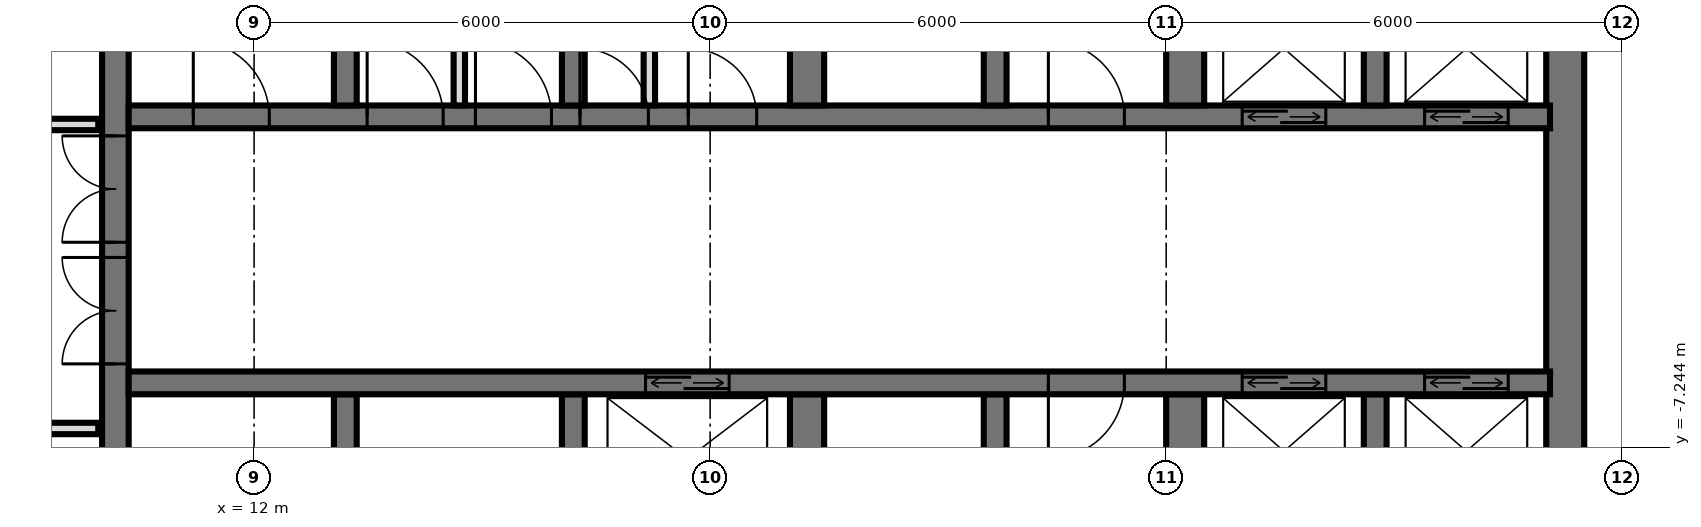
"""IFC4 building model, lengths in metres.
Left out: names, types, materials, properties, quantities, classifications, styles, units other than length and angle.
Written with IfcOpenShell. Run it as: python <this file> out.ifc"""

import sys

from ifc_helpers import new_model, si_unit, direction, frame, frame_2d, origin, place, context, subcontext, project, spatial, rectangle, extrude, element, fill, save


model = new_model("IFC4")
c1 = context("Model", 3, precision=1e-05, world=origin(), true_north=direction((0.0, 1.0)))
c2 = subcontext(c1, "Body", "Model", "MODEL_VIEW")
j1 = project(units=[si_unit("LENGTHUNIT", "METRE"), si_unit("PLANEANGLEUNIT", "RADIAN")], contexts=[c1])
p1 = place(None, origin())
s1 = spatial("IfcSite", under=j1, at=p1, CompositionType="ELEMENT")
p2 = place(p1, origin())
s2 = spatial("IfcBuilding", under=s1, at=p2, CompositionType="ELEMENT")
p3 = place(p2, frame((0.0, 0.0, 34.8)))
s3 = spatial("IfcBuildingStorey", under=s2, at=p3, CompositionType="ELEMENT", Elevation=34.8)
p4 = place(p3, frame((10.175, -14.55, 0.0), z_axis=(0.0, 0.0, 1.0), x_axis=(0.0, 1.0, 0.0)))
e1 = element("IfcWall", 1, at=p4, inside=s3, PredefinedType="SHEAR", context=c2, shape_type="SweptSolid", body=[
    extrude(rectangle(XDim=14.1, YDim=0.35, at=frame_2d((7.05, 0.0))), origin(), (0.0, 0.0, 1.0), 3.6),
])
p5 = place(p4, frame((8.4, 0.0, 0.0)))
e2 = element("IfcOpeningElement", 2, at=p5, cuts=e1, PredefinedType="OPENING", context=c2, shape_type="SweptSolid", body=[
    extrude(rectangle(XDim=1.4, YDim=2.4, at=frame_2d((0.7, 1.2))), frame((0.0, 0.185, 0.0), z_axis=(0.0, -1.0, 0.0), x_axis=(1.0, 0.0, 0.0)), (0.0, 0.0, 1.0), 0.37),
])
p6 = place(p4, frame((10.0, 0.0, 0.0)))
e3 = element("IfcOpeningElement", 3, at=p6, cuts=e1, PredefinedType="OPENING", context=c2, shape_type="SweptSolid", body=[
    extrude(rectangle(XDim=1.4, YDim=2.4, at=frame_2d((0.7, 1.2))), frame((0.0, 0.185, 0.0), z_axis=(0.0, -1.0, 0.0), x_axis=(1.0, 0.0, 0.0)), (0.0, 0.0, 1.0), 0.37),
])
p7 = place(p4, frame((4.0, 0.0, 0.0)))
e4 = element("IfcOpeningElement", 4, at=p7, cuts=e1, PredefinedType="OPENING", context=c2, shape_type="SweptSolid", body=[
    extrude(rectangle(XDim=1.2, YDim=2.1, at=frame_2d((0.6, 1.05))), frame((0.0, 0.185, 0.0), z_axis=(0.0, -1.0, 0.0), x_axis=(1.0, 0.0, 0.0)), (0.0, 0.0, 1.0), 0.37),
])
p8 = place(p3, frame((29.25, -14.55, 0.0), z_axis=(0.0, 0.0, 1.0), x_axis=(0.0, 1.0, 0.0)))
e5 = element("IfcWall", 5, at=p8, inside=s3, PredefinedType="SHEAR", context=c2, shape_type="SweptSolid", body=[
    extrude(rectangle(XDim=14.1, YDim=0.5, at=frame_2d((7.05, 0.0))), origin(), (0.0, 0.0, 1.0), 3.6),
])
p9 = place(p3, frame((10.35, -2.9, 0.0), z_axis=(0.0, 0.0, 1.0), x_axis=(1.0, 0.0, 0.0)))
e6 = element("IfcWall", 6, at=p9, inside=s3, PredefinedType="SHEAR", context=c2, shape_type="SweptSolid", body=[
    extrude(rectangle(XDim=18.7, YDim=0.3, at=frame_2d((9.35, 0.0))), origin(), (0.0, 0.0, 1.0), 3.6),
])
p10 = place(p9, frame((14.65, 0.0, 0.0)))
e7 = element("IfcOpeningElement", 7, at=p10, cuts=e6, PredefinedType="OPENING", context=c2, shape_type="SweptSolid", body=[
    extrude(rectangle(XDim=1.1, YDim=2.1, at=frame_2d((0.55, 1.05))), frame((0.0, 0.16, 0.0), z_axis=(0.0, -1.0, 0.0), x_axis=(1.0, 0.0, 0.0)), (0.0, 0.0, 1.0), 0.32),
])
p11 = place(p9, frame((17.05, 0.0, 0.0)))
e8 = element("IfcOpeningElement", 8, at=p11, cuts=e6, PredefinedType="OPENING", context=c2, shape_type="SweptSolid", body=[
    extrude(rectangle(XDim=1.1, YDim=2.1, at=frame_2d((0.55, 1.05))), frame((0.0, 0.16, 0.0), z_axis=(0.0, -1.0, 0.0), x_axis=(1.0, 0.0, 0.0)), (0.0, 0.0, 1.0), 0.32),
])
p12 = place(p9, frame((5.938, 0.0, 0.0)))
e9 = element("IfcOpeningElement", 9, at=p12, cuts=e6, PredefinedType="OPENING", context=c2, shape_type="SweptSolid", body=[
    extrude(rectangle(XDim=0.9, YDim=2.1, at=frame_2d((0.45, 1.05))), frame((0.0, 0.16, 0.0), z_axis=(0.0, -1.0, 0.0), x_axis=(1.0, 0.0, 0.0)), (0.0, 0.0, 1.0), 0.32),
])
p13 = place(p9, frame((7.363, 0.0, 0.0)))
e10 = element("IfcOpeningElement", 10, at=p13, cuts=e6, PredefinedType="OPENING", context=c2, shape_type="SweptSolid", body=[
    extrude(rectangle(XDim=0.9, YDim=2.1, at=frame_2d((0.45, 1.05))), frame((0.0, 0.16, 0.0), z_axis=(0.0, -1.0, 0.0), x_axis=(1.0, 0.0, 0.0)), (0.0, 0.0, 1.0), 0.32),
])
p14 = place(p9, frame((0.85, 0.0, 0.0)))
e11 = element("IfcOpeningElement", 11, at=p14, cuts=e6, PredefinedType="OPENING", context=c2, shape_type="SweptSolid", body=[
    extrude(rectangle(XDim=1.0, YDim=2.1, at=frame_2d((0.5, 1.05))), frame((0.0, 0.16, 0.0), z_axis=(0.0, -1.0, 0.0), x_axis=(1.0, 0.0, 0.0)), (0.0, 0.0, 1.0), 0.32),
])
p15 = place(p9, frame((3.137, 0.0, 0.0)))
e12 = element("IfcOpeningElement", 12, at=p15, cuts=e6, PredefinedType="OPENING", context=c2, shape_type="SweptSolid", body=[
    extrude(rectangle(XDim=1.0, YDim=2.1, at=frame_2d((0.5, 1.05))), frame((0.0, 0.16, 0.0), z_axis=(0.0, -1.0, 0.0), x_axis=(1.0, 0.0, 0.0)), (0.0, 0.0, 1.0), 0.32),
])
p16 = place(p9, frame((4.562, 0.0, 0.0)))
e13 = element("IfcOpeningElement", 13, at=p16, cuts=e6, PredefinedType="OPENING", context=c2, shape_type="SweptSolid", body=[
    extrude(rectangle(XDim=1.0, YDim=2.1, at=frame_2d((0.5, 1.05))), frame((0.0, 0.16, 0.0), z_axis=(0.0, -1.0, 0.0), x_axis=(1.0, 0.0, 0.0)), (0.0, 0.0, 1.0), 0.32),
])
p17 = place(p9, frame((12.1, 0.0, 0.0)))
e14 = element("IfcOpeningElement", 14, at=p17, cuts=e6, PredefinedType="OPENING", context=c2, shape_type="SweptSolid", body=[
    extrude(rectangle(XDim=1.0, YDim=2.1, at=frame_2d((0.5, 1.05))), frame((0.0, 0.16, 0.0), z_axis=(0.0, -1.0, 0.0), x_axis=(1.0, 0.0, 0.0)), (0.0, 0.0, 1.0), 0.32),
])
p18 = place(p3, frame((10.35, -6.4, 0.0), z_axis=(0.0, 0.0, 1.0), x_axis=(1.0, 0.0, 0.0)))
e15 = element("IfcWall", 15, at=p18, inside=s3, PredefinedType="SHEAR", context=c2, shape_type="SweptSolid", body=[
    extrude(rectangle(XDim=18.7, YDim=0.3, at=frame_2d((9.35, 0.0))), origin(), (0.0, 0.0, 1.0), 3.6),
])
p19 = place(p18, frame((14.65, 0.0, 0.0)))
e16 = element("IfcOpeningElement", 16, at=p19, cuts=e15, PredefinedType="OPENING", context=c2, shape_type="SweptSolid", body=[
    extrude(rectangle(XDim=1.1, YDim=2.1, at=frame_2d((0.55, 1.05))), frame((0.0, 0.16, 0.0), z_axis=(0.0, -1.0, 0.0), x_axis=(1.0, 0.0, 0.0)), (0.0, 0.0, 1.0), 0.32),
])
p20 = place(p18, frame((17.05, 0.0, 0.0)))
e17 = element("IfcOpeningElement", 17, at=p20, cuts=e15, PredefinedType="OPENING", context=c2, shape_type="SweptSolid", body=[
    extrude(rectangle(XDim=1.1, YDim=2.1, at=frame_2d((0.55, 1.05))), frame((0.0, 0.16, 0.0), z_axis=(0.0, -1.0, 0.0), x_axis=(1.0, 0.0, 0.0)), (0.0, 0.0, 1.0), 0.32),
])
p21 = place(p18, frame((6.8, 0.0, 0.0)))
e18 = element("IfcOpeningElement", 18, at=p21, cuts=e15, PredefinedType="OPENING", context=c2, shape_type="SweptSolid", body=[
    extrude(rectangle(XDim=1.1, YDim=2.1, at=frame_2d((0.55, 1.05))), frame((0.0, 0.16, 0.0), z_axis=(0.0, -1.0, 0.0), x_axis=(1.0, 0.0, 0.0)), (0.0, 0.0, 1.0), 0.32),
])
p22 = place(p18, frame((12.1, 0.0, 0.0)))
e19 = element("IfcOpeningElement", 19, at=p22, cuts=e15, PredefinedType="OPENING", context=c2, shape_type="SweptSolid", body=[
    extrude(rectangle(XDim=1.0, YDim=2.1, at=frame_2d((0.5, 1.05))), frame((0.0, 0.16, 0.0), z_axis=(0.0, -1.0, 0.0), x_axis=(1.0, 0.0, 0.0)), (0.0, 0.0, 1.0), 0.32),
])
for number, where, z_axis, x_axis in (
    (20, (13.2, -2.75, 0.0), (0.0, 0.0, 1.0), (0.0, 1.0, 0.0)),
    (21, (13.2, -8.85, 0.0), (0.0, 0.0, 1.0), (0.0, 1.0, 0.0)),
    (22, (16.2, -2.75, 0.0), (0.0, 0.0, 1.0), (0.0, 1.0, 0.0)),
    (23, (16.2, -8.85, 0.0), (0.0, 0.0, 1.0), (0.0, 1.0, 0.0)),
):
    element("IfcWall", number, at=place(p3, frame(where, z_axis=z_axis, x_axis=x_axis)), inside=s3, PredefinedType="SHEAR", context=c2, shape_type="SweptSolid", body=[
        extrude(rectangle(XDim=2.3, YDim=0.3, at=frame_2d((1.15, 0.0))), origin(), (0.0, 0.0, 1.0), 3.6),
    ])
for number, where, z_axis, x_axis in (
    (24, (19.275, -2.75, 0.0), (0.0, 0.0, 1.0), (0.0, 1.0, 0.0)),
    (25, (19.275, -8.85, 0.0), (0.0, 0.0, 1.0), (0.0, 1.0, 0.0)),
):
    element("IfcWall", number, at=place(p3, frame(where, z_axis=z_axis, x_axis=x_axis)), inside=s3, PredefinedType="SHEAR", context=c2, shape_type="SweptSolid", body=[
        extrude(rectangle(XDim=2.3, YDim=0.45, at=frame_2d((1.15, 0.0))), origin(), (0.0, 0.0, 1.0), 3.6),
    ])
for number, where, z_axis, x_axis in (
    (26, (21.75, -2.75, 0.0), (0.0, 0.0, 1.0), (0.0, 1.0, 0.0)),
    (27, (21.75, -8.85, 0.0), (0.0, 0.0, 1.0), (0.0, 1.0, 0.0)),
):
    element("IfcWall", number, at=place(p3, frame(where, z_axis=z_axis, x_axis=x_axis)), inside=s3, PredefinedType="SHEAR", context=c2, shape_type="SweptSolid", body=[
        extrude(rectangle(XDim=2.3, YDim=0.3, at=frame_2d((1.15, 0.0))), origin(), (0.0, 0.0, 1.0), 3.6),
    ])
for number, where, z_axis, x_axis in (
    (28, (24.25, -2.75, 0.0), (0.0, 0.0, 1.0), (0.0, 1.0, 0.0)),
    (29, (24.25, -8.85, 0.0), (0.0, 0.0, 1.0), (0.0, 1.0, 0.0)),
):
    element("IfcWall", number, at=place(p3, frame(where, z_axis=z_axis, x_axis=x_axis)), inside=s3, PredefinedType="SHEAR", context=c2, shape_type="SweptSolid", body=[
        extrude(rectangle(XDim=2.3, YDim=0.5, at=frame_2d((1.15, 0.0))), origin(), (0.0, 0.0, 1.0), 3.6),
    ])
for number, where, z_axis, x_axis in (
    (30, (26.75, -2.75, 0.0), (0.0, 0.0, 1.0), (0.0, 1.0, 0.0)),
    (31, (26.75, -8.85, 0.0), (0.0, 0.0, 1.0), (0.0, 1.0, 0.0)),
):
    element("IfcWall", number, at=place(p3, frame(where, z_axis=z_axis, x_axis=x_axis)), inside=s3, PredefinedType="SHEAR", context=c2, shape_type="SweptSolid", body=[
        extrude(rectangle(XDim=2.3, YDim=0.3, at=frame_2d((1.15, 0.0))), origin(), (0.0, 0.0, 1.0), 3.6),
    ])
for number, where, z_axis, x_axis in (
    (32, (17.2, -2.75, 0.0), (0.0, 0.0, 1.0), (0.0, 1.0, 0.0)),
    (33, (14.7, -2.75, 0.0), (0.0, 0.0, 1.0), (0.0, 1.0, 0.0)),
):
    element("IfcWall", number, at=place(p3, frame(where, z_axis=z_axis, x_axis=x_axis)), inside=s3, PredefinedType="PARTITIONING", context=c2, shape_type="SweptSolid", body=[
        extrude(rectangle(XDim=2.3, YDim=0.15, at=frame_2d((1.15, 0.0))), origin(), (0.0, 0.0, 1.0), 3.3),
    ])
p23 = place(p3, frame((-9.95, -7.0, 0.0), z_axis=(0.0, 0.0, 1.0), x_axis=(1.0, 0.0, 0.0)))
e34 = element("IfcWall", 34, at=p23, inside=s3, PredefinedType="PARTITIONING", context=c2, shape_type="SweptSolid", body=[
    extrude(rectangle(XDim=19.9, YDim=0.15, at=frame_2d((9.95, 0.0))), origin(), (0.0, 0.0, 1.0), 3.32),
])
p24 = place(p23, frame((9.45, 0.0, 0.0)))
e35 = element("IfcOpeningElement", 35, at=p24, cuts=e34, PredefinedType="OPENING", context=c2, shape_type="SweptSolid", body=[
    extrude(rectangle(XDim=1.0, YDim=2.1, at=frame_2d((0.5, 1.05))), frame((0.0, 0.085, 0.0), z_axis=(0.0, -1.0, 0.0), x_axis=(1.0, 0.0, 0.0)), (0.0, 0.0, 1.0), 0.17),
])
p25 = place(p23, frame((15.45, 0.0, 0.0)))
e36 = element("IfcOpeningElement", 36, at=p25, cuts=e34, PredefinedType="OPENING", context=c2, shape_type="SweptSolid", body=[
    extrude(rectangle(XDim=1.0, YDim=2.1, at=frame_2d((0.5, 1.05))), frame((0.0, 0.085, 0.0), z_axis=(0.0, -1.0, 0.0), x_axis=(1.0, 0.0, 0.0)), (0.0, 0.0, 1.0), 0.17),
])
p26 = place(p3, frame((-9.95, -3.0, 0.0), z_axis=(0.0, 0.0, 1.0), x_axis=(1.0, 0.0, 0.0)))
e37 = element("IfcWall", 37, at=p26, inside=s3, PredefinedType="PARTITIONING", context=c2, shape_type="SweptSolid", body=[
    extrude(rectangle(XDim=19.9, YDim=0.15, at=frame_2d((9.95, 0.0))), origin(), (0.0, 0.0, 1.0), 3.32),
])
p27 = place(p26, frame((1.7, 0.0, 0.0)))
e38 = element("IfcOpeningElement", 38, at=p27, cuts=e37, PredefinedType="OPENING", context=c2, shape_type="SweptSolid", body=[
    extrude(rectangle(XDim=1.0, YDim=2.1, at=frame_2d((0.5, 1.05))), frame((0.0, 0.085, 0.0), z_axis=(0.0, -1.0, 0.0), x_axis=(1.0, 0.0, 0.0)), (0.0, 0.0, 1.0), 0.17),
])
p28 = place(p26, frame((5.45, 0.0, 0.0)))
e39 = element("IfcOpeningElement", 39, at=p28, cuts=e37, PredefinedType="OPENING", context=c2, shape_type="SweptSolid", body=[
    extrude(rectangle(XDim=1.0, YDim=2.1, at=frame_2d((0.5, 1.05))), frame((0.0, 0.085, 0.0), z_axis=(0.0, -1.0, 0.0), x_axis=(1.0, 0.0, 0.0)), (0.0, 0.0, 1.0), 0.17),
])
p29 = place(p26, frame((8.2, 0.0, 0.0)))
e40 = element("IfcOpeningElement", 40, at=p29, cuts=e37, PredefinedType="OPENING", context=c2, shape_type="SweptSolid", body=[
    extrude(rectangle(XDim=1.0, YDim=2.1, at=frame_2d((0.5, 1.05))), frame((0.0, 0.085, 0.0), z_axis=(0.0, -1.0, 0.0), x_axis=(1.0, 0.0, 0.0)), (0.0, 0.0, 1.0), 0.17),
])
p30 = place(p26, frame((11.95, 0.0, 0.0)))
e41 = element("IfcOpeningElement", 41, at=p30, cuts=e37, PredefinedType="OPENING", context=c2, shape_type="SweptSolid", body=[
    extrude(rectangle(XDim=1.0, YDim=2.1, at=frame_2d((0.5, 1.05))), frame((0.0, 0.085, 0.0), z_axis=(0.0, -1.0, 0.0), x_axis=(1.0, 0.0, 0.0)), (0.0, 0.0, 1.0), 0.17),
])
p31 = place(p26, frame((16.95, 0.0, 0.0)))
e42 = element("IfcOpeningElement", 42, at=p31, cuts=e37, PredefinedType="OPENING", context=c2, shape_type="SweptSolid", body=[
    extrude(rectangle(XDim=1.0, YDim=2.1, at=frame_2d((0.5, 1.05))), frame((0.0, 0.085, 0.0), z_axis=(0.0, -1.0, 0.0), x_axis=(1.0, 0.0, 0.0)), (0.0, 0.0, 1.0), 0.17),
])
p32 = place(p10, origin())
e43 = element("IfcDoor", 43, at=p32, inside=s3, OperationType="DOUBLE_DOOR_SLIDING", PredefinedType="USERDEFINED", context=c2, shape_type="SweptSolid", body=[
    extrude(rectangle(XDim=1.1, YDim=2.1, at=frame_2d((0.55, 1.05))), frame((0.0, 0.025, 0.0), z_axis=(0.0, -1.0, 0.0), x_axis=(1.0, 0.0, 0.0)), (0.0, 0.0, 1.0), 0.05),
])
fill(e7, e43)
p33 = place(p11, origin())
e44 = element("IfcDoor", 44, at=p33, inside=s3, OperationType="DOUBLE_DOOR_SLIDING", PredefinedType="USERDEFINED", context=c2, shape_type="SweptSolid", body=[
    extrude(rectangle(XDim=1.1, YDim=2.1, at=frame_2d((0.55, 1.05))), frame((0.0, 0.025, 0.0), z_axis=(0.0, -1.0, 0.0), x_axis=(1.0, 0.0, 0.0)), (0.0, 0.0, 1.0), 0.05),
])
fill(e8, e44)
p34 = place(p19, origin())
e45 = element("IfcDoor", 45, at=p34, inside=s3, OperationType="DOUBLE_DOOR_SLIDING", PredefinedType="USERDEFINED", context=c2, shape_type="SweptSolid", body=[
    extrude(rectangle(XDim=1.1, YDim=2.1, at=frame_2d((0.55, 1.05))), frame((0.0, 0.025, 0.0), z_axis=(0.0, -1.0, 0.0), x_axis=(1.0, 0.0, 0.0)), (0.0, 0.0, 1.0), 0.05),
])
fill(e16, e45)
p35 = place(p20, origin())
e46 = element("IfcDoor", 46, at=p35, inside=s3, OperationType="DOUBLE_DOOR_SLIDING", PredefinedType="USERDEFINED", context=c2, shape_type="SweptSolid", body=[
    extrude(rectangle(XDim=1.1, YDim=2.1, at=frame_2d((0.55, 1.05))), frame((0.0, 0.025, 0.0), z_axis=(0.0, -1.0, 0.0), x_axis=(1.0, 0.0, 0.0)), (0.0, 0.0, 1.0), 0.05),
])
fill(e17, e46)
p36 = place(p21, origin())
e47 = element("IfcDoor", 47, at=p36, inside=s3, OperationType="DOUBLE_DOOR_SLIDING", PredefinedType="USERDEFINED", context=c2, shape_type="SweptSolid", body=[
    extrude(rectangle(XDim=1.1, YDim=2.1, at=frame_2d((0.55, 1.05))), frame((0.0, 0.025, 0.0), z_axis=(0.0, -1.0, 0.0), x_axis=(1.0, 0.0, 0.0)), (0.0, 0.0, 1.0), 0.05),
])
fill(e18, e47)
p37 = place(p5, origin())
e48 = element("IfcDoor", 48, at=p37, inside=s3, OperationType="DOUBLE_DOOR_SINGLE_SWING", PredefinedType="DOOR", context=c2, shape_type="SweptSolid", body=[
    extrude(rectangle(XDim=1.4, YDim=2.4, at=frame_2d((0.7, 1.2))), frame((0.0, 0.025, 0.0), z_axis=(0.0, -1.0, 0.0), x_axis=(1.0, 0.0, 0.0)), (0.0, 0.0, 1.0), 0.05),
])
fill(e2, e48)
p38 = place(p6, origin())
e49 = element("IfcDoor", 49, at=p38, inside=s3, OperationType="DOUBLE_DOOR_SINGLE_SWING", PredefinedType="DOOR", context=c2, shape_type="SweptSolid", body=[
    extrude(rectangle(XDim=1.4, YDim=2.4, at=frame_2d((0.7, 1.2))), frame((0.0, 0.025, 0.0), z_axis=(0.0, -1.0, 0.0), x_axis=(1.0, 0.0, 0.0)), (0.0, 0.0, 1.0), 0.05),
])
fill(e3, e49)
p39 = place(p12, origin())
e50 = element("IfcDoor", 50, at=p39, inside=s3, OperationType="SINGLE_SWING_RIGHT", PredefinedType="DOOR", context=c2, shape_type="SweptSolid", body=[
    extrude(rectangle(XDim=0.9, YDim=2.1, at=frame_2d((0.45, 1.05))), frame((0.0, 0.025, 0.0), z_axis=(0.0, -1.0, 0.0), x_axis=(1.0, 0.0, 0.0)), (0.0, 0.0, 1.0), 0.05),
])
fill(e9, e50)
p40 = place(p13, origin())
e51 = element("IfcDoor", 51, at=p40, inside=s3, OperationType="SINGLE_SWING_RIGHT", PredefinedType="DOOR", context=c2, shape_type="SweptSolid", body=[
    extrude(rectangle(XDim=0.9, YDim=2.1, at=frame_2d((0.45, 1.05))), frame((0.0, 0.025, 0.0), z_axis=(0.0, -1.0, 0.0), x_axis=(1.0, 0.0, 0.0)), (0.0, 0.0, 1.0), 0.05),
])
fill(e10, e51)
p41 = place(p14, origin())
e52 = element("IfcDoor", 52, at=p41, inside=s3, OperationType="SINGLE_SWING_RIGHT", PredefinedType="DOOR", context=c2, shape_type="SweptSolid", body=[
    extrude(rectangle(XDim=1.0, YDim=2.1, at=frame_2d((0.5, 1.05))), frame((0.0, 0.025, 0.0), z_axis=(0.0, -1.0, 0.0), x_axis=(1.0, 0.0, 0.0)), (0.0, 0.0, 1.0), 0.05),
])
fill(e11, e52)
p42 = place(p15, origin())
e53 = element("IfcDoor", 53, at=p42, inside=s3, OperationType="SINGLE_SWING_RIGHT", PredefinedType="DOOR", context=c2, shape_type="SweptSolid", body=[
    extrude(rectangle(XDim=1.0, YDim=2.1, at=frame_2d((0.5, 1.05))), frame((0.0, 0.025, 0.0), z_axis=(0.0, -1.0, 0.0), x_axis=(1.0, 0.0, 0.0)), (0.0, 0.0, 1.0), 0.05),
])
fill(e12, e53)
p43 = place(p16, origin())
e54 = element("IfcDoor", 54, at=p43, inside=s3, OperationType="SINGLE_SWING_RIGHT", PredefinedType="DOOR", context=c2, shape_type="SweptSolid", body=[
    extrude(rectangle(XDim=1.0, YDim=2.1, at=frame_2d((0.5, 1.05))), frame((0.0, 0.025, 0.0), z_axis=(0.0, -1.0, 0.0), x_axis=(1.0, 0.0, 0.0)), (0.0, 0.0, 1.0), 0.05),
])
fill(e13, e54)
p44 = place(p17, origin())
e55 = element("IfcDoor", 55, at=p44, inside=s3, OperationType="SINGLE_SWING_RIGHT", PredefinedType="DOOR", context=c2, shape_type="SweptSolid", body=[
    extrude(rectangle(XDim=1.0, YDim=2.1, at=frame_2d((0.5, 1.05))), frame((0.0, 0.025, 0.0), z_axis=(0.0, -1.0, 0.0), x_axis=(1.0, 0.0, 0.0)), (0.0, 0.0, 1.0), 0.05),
])
fill(e14, e55)
p45 = place(p22, frame((0.5, 0.0, 0.0), z_axis=(0.0, 0.0, 1.0), x_axis=(-1.0, 0.0, 0.0)))
e56 = element("IfcDoor", 56, at=p45, inside=s3, OperationType="SINGLE_SWING_LEFT", PredefinedType="DOOR", context=c2, shape_type="SweptSolid", body=[
    extrude(rectangle(XDim=1.0, YDim=2.1, at=frame_2d((0.0, 1.05))), frame((0.0, -0.025, 0.0), z_axis=(0.0, 1.0, 0.0), x_axis=(-1.0, 0.0, 0.0)), (0.0, 0.0, 1.0), 0.05),
])
fill(e19, e56)
save(model, sys.argv[1])
